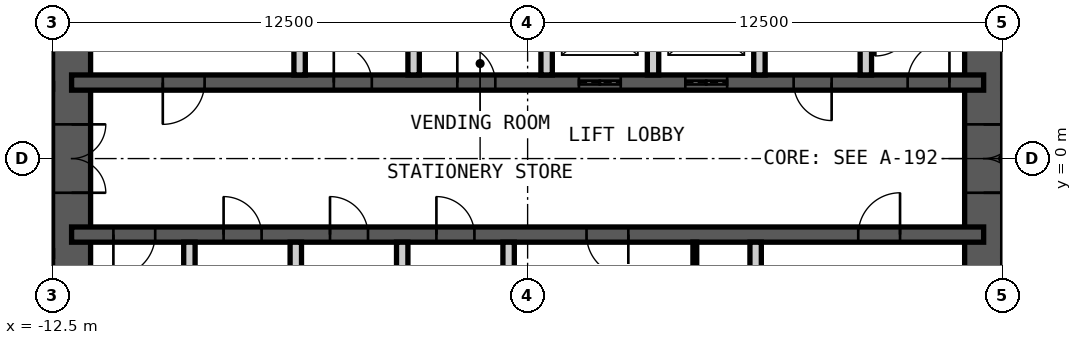
"""IFC4 building model, lengths in metres.
Left out: names, types, materials, properties, quantities, classifications, styles, units other than length and angle.
Written with IfcOpenShell. Run it as: python <this file> out.ifc"""

import sys

from ifc_helpers import new_model, si_unit, direction, frame, frame_2d, origin, place, context, subcontext, project, spatial, rectangle, extrude, element, fill, save


model = new_model("IFC4")
c1 = context("Model", 3, precision=1e-05, world=origin(), true_north=direction((0.0, 1.0)))
c2 = subcontext(c1, "Body", "Model", "MODEL_VIEW")
j1 = project(units=[si_unit("LENGTHUNIT", "METRE"), si_unit("PLANEANGLEUNIT", "RADIAN")], contexts=[c1])
p1 = place(None, origin())
s1 = spatial("IfcSite", under=j1, at=p1, CompositionType="ELEMENT")
p2 = place(p1, origin())
s2 = spatial("IfcBuilding", under=s1, at=p2, CompositionType="ELEMENT")
p3 = place(p2, frame((0.0, 0.0, 270.4)))
s3 = spatial("IfcBuildingStorey", under=s2, at=p3, CompositionType="ELEMENT", Elevation=270.4)
p4 = place(p3, frame((12.0, -9.0, 0.0), z_axis=(0.0, 0.0, 1.0), x_axis=(0.0, 1.0, 0.0)))
e1 = element("IfcWall", 1, at=p4, inside=s3, PredefinedType="SHEAR", context=c2, shape_type="SweptSolid", body=[
    extrude(rectangle(XDim=18.0, YDim=1.0, at=frame_2d((9.0, 0.0))), origin(), (0.0, 0.0, 1.0), 4.2),
])
p5 = place(p4, frame((8.1, 0.0, 0.0)))
e2 = element("IfcOpeningElement", 2, at=p5, cuts=e1, PredefinedType="OPENING", context=c2, shape_type="SweptSolid", body=[
    extrude(rectangle(XDim=1.8, YDim=2.1, at=frame_2d((0.9, 1.05))), frame((0.0, 0.51, 0.0), z_axis=(0.0, -1.0, 0.0), x_axis=(1.0, 0.0, 0.0)), (0.0, 0.0, 1.0), 1.02),
])
p6 = place(p3, frame((-12.0, -9.0, 0.0), z_axis=(0.0, 0.0, 1.0), x_axis=(0.0, 1.0, 0.0)))
e3 = element("IfcWall", 3, at=p6, inside=s3, PredefinedType="SHEAR", context=c2, shape_type="SweptSolid", body=[
    extrude(rectangle(XDim=18.0, YDim=1.0, at=frame_2d((9.0, 0.0))), origin(), (0.0, 0.0, 1.0), 4.2),
])
p7 = place(p6, frame((8.1, 0.0, 0.0)))
e4 = element("IfcOpeningElement", 4, at=p7, cuts=e3, PredefinedType="OPENING", context=c2, shape_type="SweptSolid", body=[
    extrude(rectangle(XDim=1.8, YDim=2.1, at=frame_2d((0.9, 1.05))), frame((0.0, 0.51, 0.0), z_axis=(0.0, -1.0, 0.0), x_axis=(1.0, 0.0, 0.0)), (0.0, 0.0, 1.0), 1.02),
])
p8 = place(p3, frame((-12.0, 2.0, 0.0), z_axis=(0.0, 0.0, 1.0), x_axis=(1.0, 0.0, 0.0)))
e5 = element("IfcWall", 5, at=p8, inside=s3, PredefinedType="SHEAR", context=c2, shape_type="SweptSolid", body=[
    extrude(rectangle(XDim=24.0, YDim=0.4, at=frame_2d((12.0, 0.0))), origin(), (0.0, 0.0, 1.0), 4.2),
])
p9 = place(p8, frame((2.4, 0.0, 0.0)))
e6 = element("IfcOpeningElement", 6, at=p9, cuts=e5, PredefinedType="OPENING", context=c2, shape_type="SweptSolid", body=[
    extrude(rectangle(XDim=1.1, YDim=2.1, at=frame_2d((0.55, 1.05))), frame((0.0, 0.21, 0.0), z_axis=(0.0, -1.0, 0.0), x_axis=(1.0, 0.0, 0.0)), (0.0, 0.0, 1.0), 0.42),
])
p10 = place(p8, frame((22.0, 0.0, 0.0)))
e7 = element("IfcOpeningElement", 7, at=p10, cuts=e5, PredefinedType="OPENING", context=c2, shape_type="SweptSolid", body=[
    extrude(rectangle(XDim=1.1, YDim=2.1, at=frame_2d((0.55, 1.05))), frame((0.0, 0.21, 0.0), z_axis=(0.0, -1.0, 0.0), x_axis=(1.0, 0.0, 0.0)), (0.0, 0.0, 1.0), 0.42),
])
p11 = place(p8, frame((10.15, 0.0, 0.0)))
e8 = element("IfcOpeningElement", 8, at=p11, cuts=e5, PredefinedType="OPENING", context=c2, shape_type="SweptSolid", body=[
    extrude(rectangle(XDim=1.0, YDim=2.1, at=frame_2d((0.5, 1.05))), frame((0.0, 0.21, 0.0), z_axis=(0.0, -1.0, 0.0), x_axis=(1.0, 0.0, 0.0)), (0.0, 0.0, 1.0), 0.42),
])
p12 = place(p8, frame((6.9, 0.0, 0.0)))
e9 = element("IfcOpeningElement", 9, at=p12, cuts=e5, PredefinedType="OPENING", context=c2, shape_type="SweptSolid", body=[
    extrude(rectangle(XDim=1.0, YDim=2.1, at=frame_2d((0.5, 1.05))), frame((0.0, 0.21, 0.0), z_axis=(0.0, -1.0, 0.0), x_axis=(1.0, 0.0, 0.0)), (0.0, 0.0, 1.0), 0.42),
])
p13 = place(p8, frame((13.35, 0.0, 0.0)))
e10 = element("IfcOpeningElement", 10, at=p13, cuts=e5, PredefinedType="OPENING", context=c2, shape_type="SweptSolid", body=[
    extrude(rectangle(XDim=1.1, YDim=2.4, at=frame_2d((0.55, 1.2))), frame((0.0, 0.21, 0.0), z_axis=(0.0, -1.0, 0.0), x_axis=(1.0, 0.0, 0.0)), (0.0, 0.0, 1.0), 0.42),
])
p14 = place(p8, frame((16.15, 0.0, 0.0)))
e11 = element("IfcOpeningElement", 11, at=p14, cuts=e5, PredefinedType="OPENING", context=c2, shape_type="SweptSolid", body=[
    extrude(rectangle(XDim=1.1, YDim=2.4, at=frame_2d((0.55, 1.2))), frame((0.0, 0.21, 0.0), z_axis=(0.0, -1.0, 0.0), x_axis=(1.0, 0.0, 0.0)), (0.0, 0.0, 1.0), 0.42),
])
p15 = place(p8, frame((19.0, 0.0, 0.0)))
e12 = element("IfcOpeningElement", 12, at=p15, cuts=e5, PredefinedType="OPENING", context=c2, shape_type="SweptSolid", body=[
    extrude(rectangle(XDim=1.0, YDim=2.1, at=frame_2d((0.5, 1.05))), frame((0.0, 0.21, 0.0), z_axis=(0.0, -1.0, 0.0), x_axis=(1.0, 0.0, 0.0)), (0.0, 0.0, 1.0), 0.42),
])
p16 = place(p3, frame((-12.0, -2.0, 0.0), z_axis=(0.0, 0.0, 1.0), x_axis=(1.0, 0.0, 0.0)))
e13 = element("IfcWall", 13, at=p16, inside=s3, PredefinedType="SHEAR", context=c2, shape_type="SweptSolid", body=[
    extrude(rectangle(XDim=24.0, YDim=0.4, at=frame_2d((12.0, 0.0))), origin(), (0.0, 0.0, 1.0), 4.2),
])
p17 = place(p16, frame((1.1, 0.0, 0.0)))
e14 = element("IfcOpeningElement", 14, at=p17, cuts=e13, PredefinedType="OPENING", context=c2, shape_type="SweptSolid", body=[
    extrude(rectangle(XDim=1.1, YDim=2.1, at=frame_2d((0.55, 1.05))), frame((0.0, 0.21, 0.0), z_axis=(0.0, -1.0, 0.0), x_axis=(1.0, 0.0, 0.0)), (0.0, 0.0, 1.0), 0.42),
])
p18 = place(p16, frame((13.55, 0.0, 0.0)))
e15 = element("IfcOpeningElement", 15, at=p18, cuts=e13, PredefinedType="OPENING", context=c2, shape_type="SweptSolid", body=[
    extrude(rectangle(XDim=1.1, YDim=2.1, at=frame_2d((0.55, 1.05))), frame((0.0, 0.21, 0.0), z_axis=(0.0, -1.0, 0.0), x_axis=(1.0, 0.0, 0.0)), (0.0, 0.0, 1.0), 0.42),
])
p19 = place(p16, frame((20.7, 0.0, 0.0)))
e16 = element("IfcOpeningElement", 16, at=p19, cuts=e13, PredefinedType="OPENING", context=c2, shape_type="SweptSolid", body=[
    extrude(rectangle(XDim=1.1, YDim=2.1, at=frame_2d((0.55, 1.05))), frame((0.0, 0.21, 0.0), z_axis=(0.0, -1.0, 0.0), x_axis=(1.0, 0.0, 0.0)), (0.0, 0.0, 1.0), 0.42),
])
p20 = place(p16, frame((4.0, 0.0, 0.0)))
e17 = element("IfcOpeningElement", 17, at=p20, cuts=e13, PredefinedType="OPENING", context=c2, shape_type="SweptSolid", body=[
    extrude(rectangle(XDim=1.0, YDim=2.1, at=frame_2d((0.5, 1.05))), frame((0.0, 0.21, 0.0), z_axis=(0.0, -1.0, 0.0), x_axis=(1.0, 0.0, 0.0)), (0.0, 0.0, 1.0), 0.42),
])
p21 = place(p16, frame((6.8, 0.0, 0.0)))
e18 = element("IfcOpeningElement", 18, at=p21, cuts=e13, PredefinedType="OPENING", context=c2, shape_type="SweptSolid", body=[
    extrude(rectangle(XDim=1.0, YDim=2.1, at=frame_2d((0.5, 1.05))), frame((0.0, 0.21, 0.0), z_axis=(0.0, -1.0, 0.0), x_axis=(1.0, 0.0, 0.0)), (0.0, 0.0, 1.0), 0.42),
])
p22 = place(p16, frame((9.6, 0.0, 0.0)))
e19 = element("IfcOpeningElement", 19, at=p22, cuts=e13, PredefinedType="OPENING", context=c2, shape_type="SweptSolid", body=[
    extrude(rectangle(XDim=1.0, YDim=2.1, at=frame_2d((0.5, 1.05))), frame((0.0, 0.21, 0.0), z_axis=(0.0, -1.0, 0.0), x_axis=(1.0, 0.0, 0.0)), (0.0, 0.0, 1.0), 0.42),
])
for number, where, z_axis, x_axis in (
    (20, (-6.0, 2.2, 0.0), (0.0, 0.0, 1.0), (0.0, 1.0, 0.0)),
    (21, (-3.0, 2.2, 0.0), (0.0, 0.0, 1.0), (0.0, 1.0, 0.0)),
    (22, (0.5, 2.2, 0.0), (0.0, 0.0, 1.0), (0.0, 1.0, 0.0)),
    (23, (3.3, 2.2, 0.0), (0.0, 0.0, 1.0), (0.0, 1.0, 0.0)),
    (24, (6.1, 2.2, 0.0), (0.0, 0.0, 1.0), (0.0, 1.0, 0.0)),
    (25, (8.9, 2.2, 0.0), (0.0, 0.0, 1.0), (0.0, 1.0, 0.0)),
    (26, (-8.9, -4.85, 0.0), (0.0, 0.0, 1.0), (0.0, 1.0, 0.0)),
    (27, (-6.1, -4.85, 0.0), (0.0, 0.0, 1.0), (0.0, 1.0, 0.0)),
    (28, (-3.3, -4.85, 0.0), (0.0, 0.0, 1.0), (0.0, 1.0, 0.0)),
    (29, (-0.5, -4.85, 0.0), (0.0, 0.0, 1.0), (0.0, 1.0, 0.0)),
    (30, (6.0, -4.85, 0.0), (0.0, 0.0, 1.0), (0.0, 1.0, 0.0)),
):
    element("IfcWall", number, at=place(p3, frame(where, z_axis=z_axis, x_axis=x_axis)), inside=s3, PredefinedType="PARTITIONING", context=c2, shape_type="SweptSolid", body=[
        extrude(rectangle(XDim=2.65, YDim=0.3, at=frame_2d((1.325, 0.0))), origin(), (0.0, 0.0, 1.0), 3.98),
    ])
p23 = place(p3, frame((4.4, -4.85, 0.0), z_axis=(0.0, 0.0, 1.0), x_axis=(0.0, 1.0, 0.0)))
e31 = element("IfcWall", 31, at=p23, inside=s3, PredefinedType="PARTITIONING", context=c2, shape_type="SweptSolid", body=[
    extrude(rectangle(XDim=2.65, YDim=0.1, at=frame_2d((1.325, 0.0))), origin(), (0.0, 0.0, 1.0), 3.98),
])
p24 = place(p23, frame((0.1, 0.0, 0.0)))
e32 = element("IfcOpeningElement", 32, at=p24, cuts=e31, PredefinedType="OPENING", context=c2, shape_type="SweptSolid", body=[
    extrude(rectangle(XDim=1.0, YDim=2.4, at=frame_2d((0.5, 1.2))), frame((0.0, 0.06, 0.0), z_axis=(0.0, -1.0, 0.0), x_axis=(1.0, 0.0, 0.0)), (0.0, 0.0, 1.0), 0.12),
])
p25 = place(p9, origin())
e33 = element("IfcDoor", 33, at=p25, inside=s3, OperationType="SINGLE_SWING_LEFT", PredefinedType="DOOR", context=c2, shape_type="SweptSolid", body=[
    extrude(rectangle(XDim=1.1, YDim=2.1, at=frame_2d((0.55, 1.05))), frame((0.0, 0.025, 0.0), z_axis=(0.0, -1.0, 0.0), x_axis=(1.0, 0.0, 0.0)), (0.0, 0.0, 1.0), 0.05),
])
fill(e6, e33)
p26 = place(p17, origin())
e34 = element("IfcDoor", 34, at=p26, inside=s3, OperationType="SINGLE_SWING_LEFT", PredefinedType="DOOR", context=c2, shape_type="SweptSolid", body=[
    extrude(rectangle(XDim=1.1, YDim=2.1, at=frame_2d((0.55, 1.05))), frame((0.0, 0.025, 0.0), z_axis=(0.0, -1.0, 0.0), x_axis=(1.0, 0.0, 0.0)), (0.0, 0.0, 1.0), 0.05),
])
fill(e14, e34)
p27 = place(p10, origin())
e35 = element("IfcDoor", 35, at=p27, inside=s3, OperationType="SINGLE_SWING_LEFT", PredefinedType="DOOR", context=c2, shape_type="SweptSolid", body=[
    extrude(rectangle(XDim=1.1, YDim=2.1, at=frame_2d((0.55, 1.05))), frame((0.0, 0.025, 0.0), z_axis=(0.0, -1.0, 0.0), x_axis=(1.0, 0.0, 0.0)), (0.0, 0.0, 1.0), 0.05),
])
fill(e7, e35)
p28 = place(p11, origin())
e36 = element("IfcDoor", 36, at=p28, inside=s3, OperationType="SINGLE_SWING_RIGHT", PredefinedType="DOOR", context=c2, shape_type="SweptSolid", body=[
    extrude(rectangle(XDim=1.0, YDim=2.1, at=frame_2d((0.5, 1.05))), frame((0.0, 0.025, 0.0), z_axis=(0.0, -1.0, 0.0), x_axis=(1.0, 0.0, 0.0)), (0.0, 0.0, 1.0), 0.05),
])
fill(e8, e36)
p29 = place(p18, origin())
e37 = element("IfcDoor", 37, at=p29, inside=s3, OperationType="SINGLE_SWING_RIGHT", PredefinedType="DOOR", context=c2, shape_type="SweptSolid", body=[
    extrude(rectangle(XDim=1.1, YDim=2.1, at=frame_2d((0.55, 1.05))), frame((0.0, 0.025, 0.0), z_axis=(0.0, -1.0, 0.0), x_axis=(1.0, 0.0, 0.0)), (0.0, 0.0, 1.0), 0.05),
])
fill(e15, e37)
p30 = place(p19, origin())
e38 = element("IfcDoor", 38, at=p30, inside=s3, OperationType="SINGLE_SWING_LEFT", PredefinedType="DOOR", context=c2, shape_type="SweptSolid", body=[
    extrude(rectangle(XDim=1.1, YDim=2.1, at=frame_2d((0.55, 1.05))), frame((0.0, 0.025, 0.0), z_axis=(0.0, -1.0, 0.0), x_axis=(1.0, 0.0, 0.0)), (0.0, 0.0, 1.0), 0.05),
])
fill(e16, e38)
p31 = place(p5, origin())
e39 = element("IfcDoor", 39, at=p31, inside=s3, OperationType="DOUBLE_DOOR_DOUBLE_SWING", PredefinedType="DOOR", context=c2, shape_type="SweptSolid", body=[
    extrude(rectangle(XDim=1.8, YDim=2.1, at=frame_2d((0.9, 1.05))), frame((0.0, 0.025, 0.0), z_axis=(0.0, -1.0, 0.0), x_axis=(1.0, 0.0, 0.0)), (0.0, 0.0, 1.0), 0.05),
])
fill(e2, e39)
p32 = place(p7, origin())
e40 = element("IfcDoor", 40, at=p32, inside=s3, OperationType="DOUBLE_DOOR_DOUBLE_SWING", PredefinedType="DOOR", context=c2, shape_type="SweptSolid", body=[
    extrude(rectangle(XDim=1.8, YDim=2.1, at=frame_2d((0.9, 1.05))), frame((0.0, 0.025, 0.0), z_axis=(0.0, -1.0, 0.0), x_axis=(1.0, 0.0, 0.0)), (0.0, 0.0, 1.0), 0.05),
])
fill(e4, e40)
p33 = place(p12, origin())
e41 = element("IfcDoor", 41, at=p33, inside=s3, OperationType="SINGLE_SWING_RIGHT", PredefinedType="DOOR", context=c2, shape_type="SweptSolid", body=[
    extrude(rectangle(XDim=1.0, YDim=2.1, at=frame_2d((0.5, 1.05))), frame((0.0, 0.025, 0.0), z_axis=(0.0, -1.0, 0.0), x_axis=(1.0, 0.0, 0.0)), (0.0, 0.0, 1.0), 0.05),
])
fill(e9, e41)
p34 = place(p13, origin())
e42 = element("IfcDoor", 42, at=p34, inside=s3, OperationType="DOUBLE_DOOR_SLIDING", PredefinedType="DOOR", context=c2, shape_type="SweptSolid", body=[
    extrude(rectangle(XDim=1.1, YDim=2.4, at=frame_2d((0.55, 1.2))), frame((0.0, 0.025, 0.0), z_axis=(0.0, -1.0, 0.0), x_axis=(1.0, 0.0, 0.0)), (0.0, 0.0, 1.0), 0.05),
])
fill(e10, e42)
p35 = place(p14, origin())
e43 = element("IfcDoor", 43, at=p35, inside=s3, OperationType="DOUBLE_DOOR_SLIDING", PredefinedType="DOOR", context=c2, shape_type="SweptSolid", body=[
    extrude(rectangle(XDim=1.1, YDim=2.4, at=frame_2d((0.55, 1.2))), frame((0.0, 0.025, 0.0), z_axis=(0.0, -1.0, 0.0), x_axis=(1.0, 0.0, 0.0)), (0.0, 0.0, 1.0), 0.05),
])
fill(e11, e43)
p36 = place(p15, origin())
e44 = element("IfcDoor", 44, at=p36, inside=s3, OperationType="SINGLE_SWING_RIGHT", PredefinedType="DOOR", context=c2, shape_type="SweptSolid", body=[
    extrude(rectangle(XDim=1.0, YDim=2.1, at=frame_2d((0.5, 1.05))), frame((0.0, 0.025, 0.0), z_axis=(0.0, -1.0, 0.0), x_axis=(1.0, 0.0, 0.0)), (0.0, 0.0, 1.0), 0.05),
])
fill(e12, e44)
p37 = place(p20, origin())
e45 = element("IfcDoor", 45, at=p37, inside=s3, OperationType="SINGLE_SWING_RIGHT", PredefinedType="DOOR", context=c2, shape_type="SweptSolid", body=[
    extrude(rectangle(XDim=1.0, YDim=2.1, at=frame_2d((0.5, 1.05))), frame((0.0, 0.025, 0.0), z_axis=(0.0, -1.0, 0.0), x_axis=(1.0, 0.0, 0.0)), (0.0, 0.0, 1.0), 0.05),
])
fill(e17, e45)
p38 = place(p21, origin())
e46 = element("IfcDoor", 46, at=p38, inside=s3, OperationType="SINGLE_SWING_RIGHT", PredefinedType="DOOR", context=c2, shape_type="SweptSolid", body=[
    extrude(rectangle(XDim=1.0, YDim=2.1, at=frame_2d((0.5, 1.05))), frame((0.0, 0.025, 0.0), z_axis=(0.0, -1.0, 0.0), x_axis=(1.0, 0.0, 0.0)), (0.0, 0.0, 1.0), 0.05),
])
fill(e18, e46)
p39 = place(p22, origin())
e47 = element("IfcDoor", 47, at=p39, inside=s3, OperationType="SINGLE_SWING_RIGHT", PredefinedType="DOOR", context=c2, shape_type="SweptSolid", body=[
    extrude(rectangle(XDim=1.0, YDim=2.1, at=frame_2d((0.5, 1.05))), frame((0.0, 0.025, 0.0), z_axis=(0.0, -1.0, 0.0), x_axis=(1.0, 0.0, 0.0)), (0.0, 0.0, 1.0), 0.05),
])
fill(e19, e47)
save(model, sys.argv[1])
